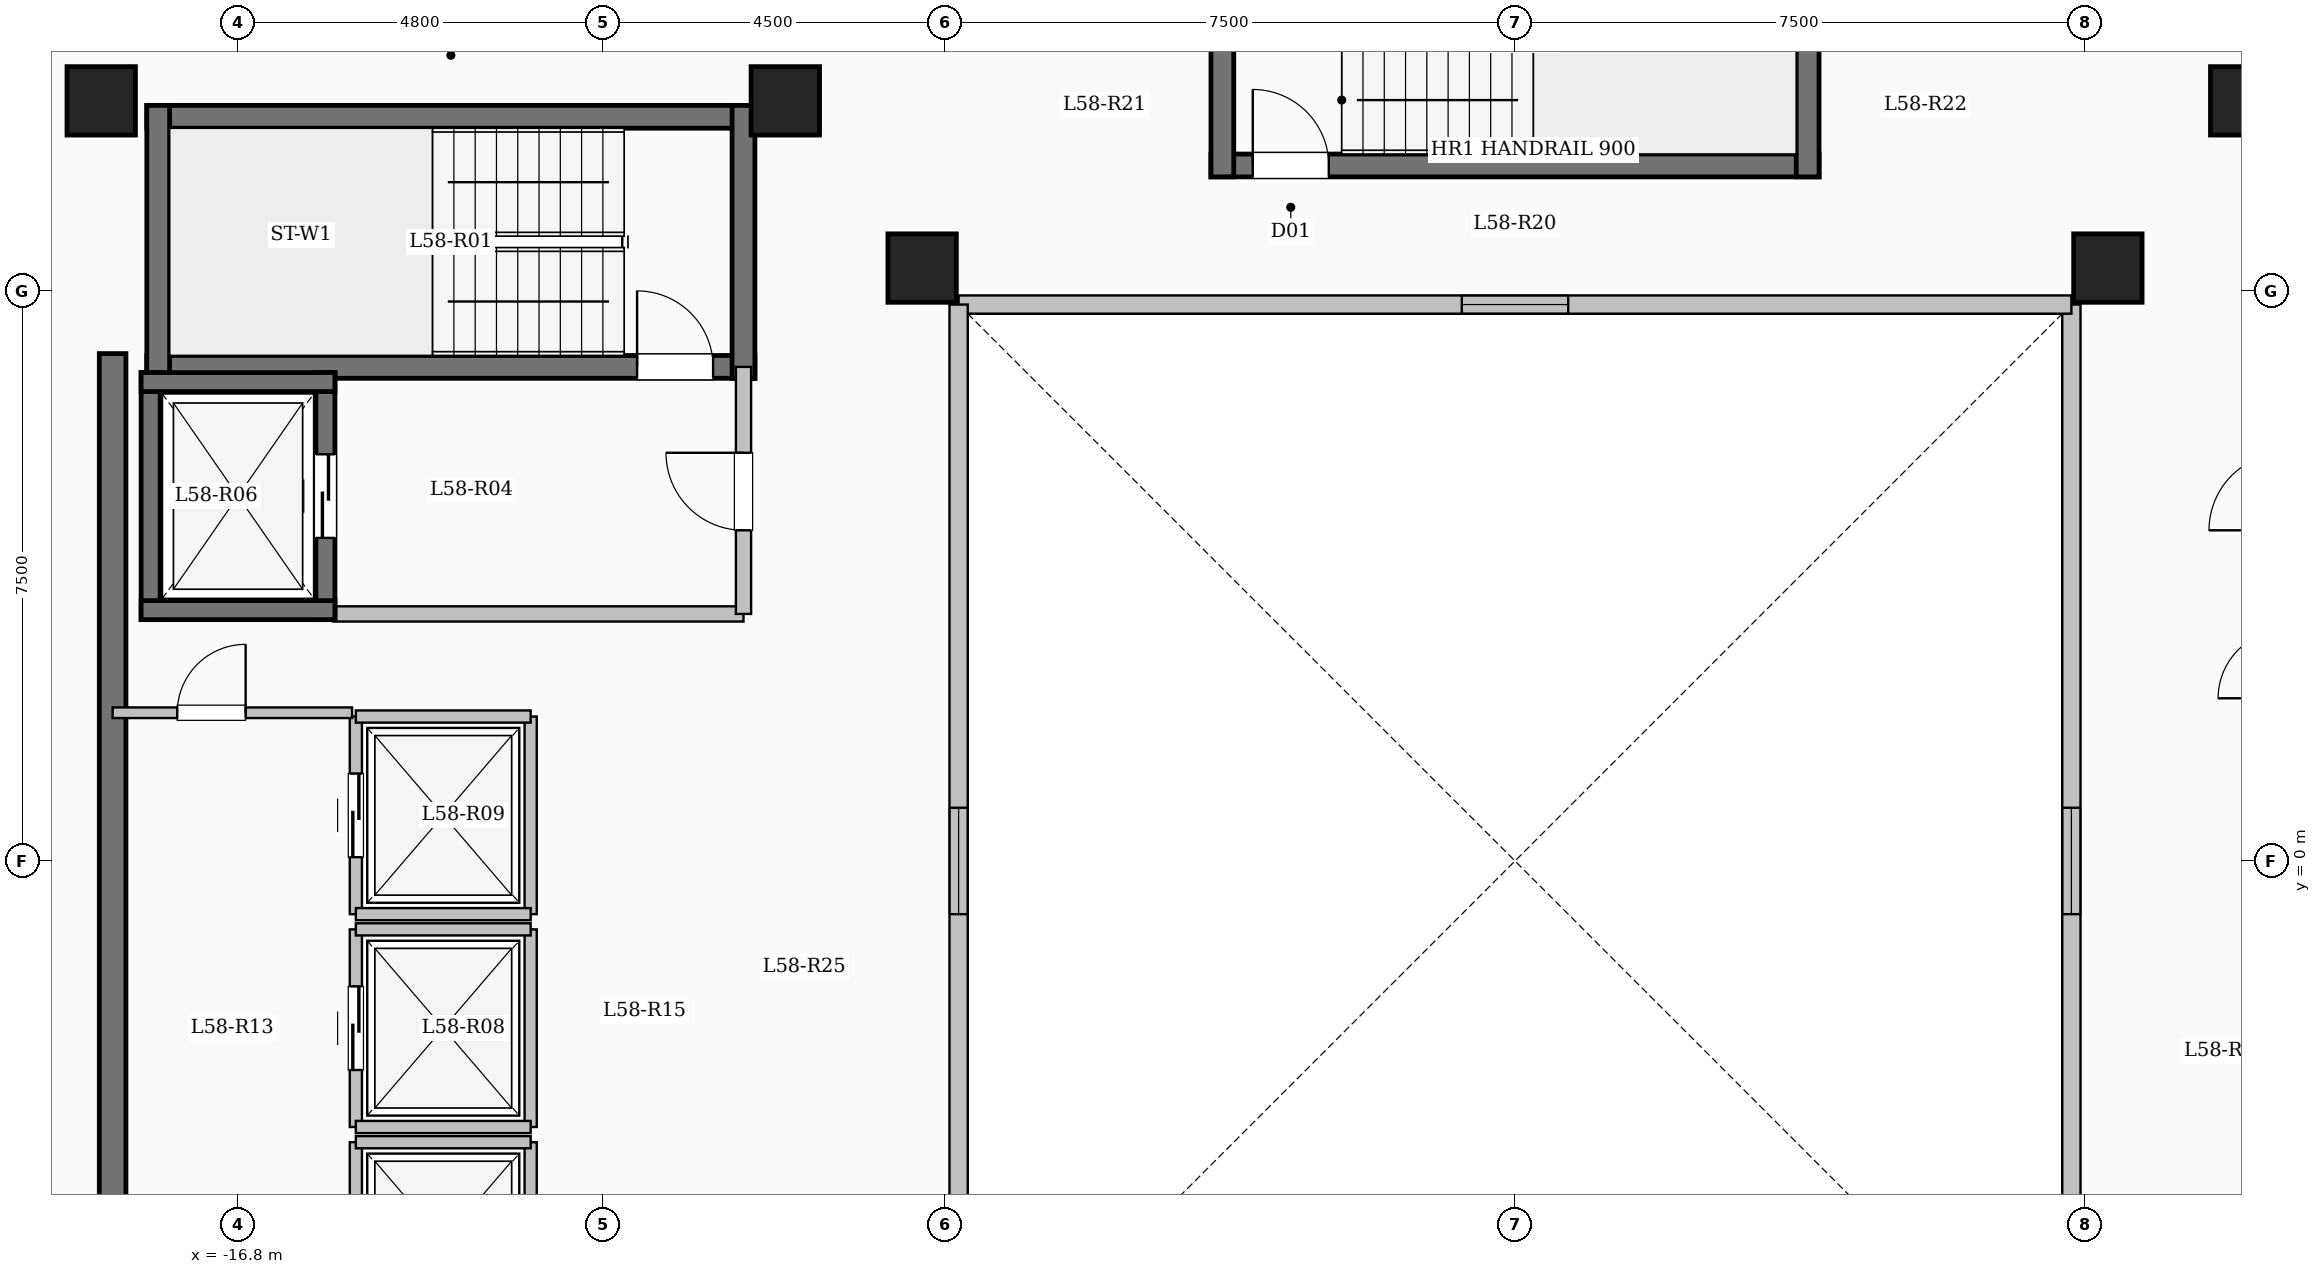
"""IFC4 building model, lengths in metres.
Left out: names, types, materials, properties, quantities, classifications, styles, units other than length and angle.
Written with IfcOpenShell. Run it as: python <this file> out.ifc"""

import sys

from ifc_helpers import new_model, si_unit, direction, frame, frame_2d, origin, origin_2d, place, context, subcontext, project, spatial, rectangle, extrude, element, fill, save


model = new_model("IFC4")
c1 = context("Model", 3, precision=1e-05, world=origin(), true_north=direction((0.0, 1.0)))
c2 = subcontext(c1, "Body", "Model", "MODEL_VIEW")
j1 = project(units=[si_unit("LENGTHUNIT", "METRE"), si_unit("PLANEANGLEUNIT", "RADIAN")], contexts=[c1])
p1 = place(None, origin())
s1 = spatial("IfcSite", under=j1, at=p1, CompositionType="ELEMENT")
p2 = place(p1, origin())
s2 = spatial("IfcBuilding", under=s1, at=p2, CompositionType="ELEMENT")
p3 = place(p2, frame((0.0, 0.0, 213.7)))
s3 = spatial("IfcBuildingStorey", under=s2, at=p3, CompositionType="ELEMENT", Elevation=213.7)
for number, where, z_axis, x_axis in (
    (1, (-7.8, 7.8, 0.0), (0.0, 0.0, 1.0), (1.0, 0.0, 0.0)),
    (2, (7.8, 7.8, 0.0), (0.0, 0.0, 1.0), (1.0, 0.0, 0.0)),
    (3, (-9.6, 10.0, 0.0), (0.0, 0.0, 1.0), (1.0, 0.0, 0.0)),
    (4, (9.6, 10.0, 0.0), (0.0, 0.0, 1.0), (1.0, 0.0, 0.0)),
    (5, (-18.6, 10.0, 0.0), (0.0, 0.0, 1.0), (1.0, 0.0, 0.0)),
):
    element("IfcColumn", number, at=place(p3, frame(where, z_axis=z_axis, x_axis=x_axis)), inside=s3, PredefinedType="COLUMN", context=c2, shape_type="SweptSolid", body=[
        extrude(rectangle(XDim=0.9, YDim=0.9, at=origin_2d()), origin(), (0.0, 0.0, 1.0), 3.35),
    ])
p4 = place(p3, frame((7.32, -7.32, 0.0), z_axis=(0.0, 0.0, 1.0), x_axis=(0.0, 1.0, 0.0)))
e6 = element("IfcWall", 6, at=p4, inside=s3, PredefinedType="SOLIDWALL", context=c2, shape_type="SweptSolid", body=[
    extrude(rectangle(XDim=14.64, YDim=0.24, at=frame_2d((7.32, 0.0))), origin(), (0.0, 0.0, 1.0), 3.1),
])
p5 = place(p4, frame((6.62, 0.0, 0.95)))
e7 = element("IfcOpeningElement", 7, at=p5, cuts=e6, PredefinedType="OPENING", context=c2, shape_type="SweptSolid", body=[
    extrude(rectangle(XDim=1.4, YDim=1.5, at=frame_2d((0.7, 0.75))), frame((0.0, 0.13, 0.0), z_axis=(0.0, -1.0, 0.0), x_axis=(1.0, 0.0, 0.0)), (0.0, 0.0, 1.0), 0.26),
])
p6 = place(p3, frame((7.32, 7.32, 0.0), z_axis=(0.0, 0.0, 1.0), x_axis=(-1.0, 0.0, 0.0)))
e8 = element("IfcWall", 8, at=p6, inside=s3, PredefinedType="SOLIDWALL", context=c2, shape_type="SweptSolid", body=[
    extrude(rectangle(XDim=14.64, YDim=0.24, at=frame_2d((7.32, 0.0))), origin(), (0.0, 0.0, 1.0), 3.1),
])
p7 = place(p6, frame((6.62, 0.0, 0.95)))
e9 = element("IfcOpeningElement", 9, at=p7, cuts=e8, PredefinedType="OPENING", context=c2, shape_type="SweptSolid", body=[
    extrude(rectangle(XDim=1.4, YDim=1.5, at=frame_2d((0.7, 0.75))), frame((0.0, 0.13, 0.0), z_axis=(0.0, -1.0, 0.0), x_axis=(1.0, 0.0, 0.0)), (0.0, 0.0, 1.0), 0.26),
])
p8 = place(p3, frame((-7.32, 7.32, 0.0), z_axis=(0.0, 0.0, 1.0), x_axis=(0.0, -1.0, 0.0)))
e10 = element("IfcWall", 10, at=p8, inside=s3, PredefinedType="SOLIDWALL", context=c2, shape_type="SweptSolid", body=[
    extrude(rectangle(XDim=14.64, YDim=0.24, at=frame_2d((7.32, 0.0))), origin(), (0.0, 0.0, 1.0), 3.1),
])
p9 = place(p8, frame((6.62, 0.0, 0.95)))
e11 = element("IfcOpeningElement", 11, at=p9, cuts=e10, PredefinedType="OPENING", context=c2, shape_type="SweptSolid", body=[
    extrude(rectangle(XDim=1.4, YDim=1.5, at=frame_2d((0.7, 0.75))), frame((0.0, 0.13, 0.0), z_axis=(0.0, -1.0, 0.0), x_axis=(1.0, 0.0, 0.0)), (0.0, 0.0, 1.0), 0.26),
])
p10 = place(p3, frame((-18.0, 9.79, 0.0), z_axis=(0.0, 0.0, 1.0), x_axis=(1.0, 0.0, 0.0)))
e12 = element("IfcWall", 12, at=p10, inside=s3, PredefinedType="SHEAR", context=c2, shape_type="SweptSolid", body=[
    extrude(rectangle(XDim=8.0, YDim=0.3, at=frame_2d((4.0, 0.0))), origin(), (0.0, 0.0, 1.0), 3.35),
])
p11 = place(p3, frame((-18.0, 6.5, 0.0), z_axis=(0.0, 0.0, 1.0), x_axis=(1.0, 0.0, 0.0)))
e13 = element("IfcWall", 13, at=p11, inside=s3, PredefinedType="SHEAR", context=c2, shape_type="SweptSolid", body=[
    extrude(rectangle(XDim=8.0, YDim=0.3, at=frame_2d((4.0, 0.0))), origin(), (0.0, 0.0, 1.0), 3.35),
])
p12 = place(p11, frame((6.45, 0.0, 0.0)))
e14 = element("IfcOpeningElement", 14, at=p12, cuts=e13, PredefinedType="OPENING", context=c2, shape_type="SweptSolid", body=[
    extrude(rectangle(XDim=1.0, YDim=2.15, at=frame_2d((0.5, 1.075))), frame((0.0, 0.16, 0.0), z_axis=(0.0, -1.0, 0.0), x_axis=(1.0, 0.0, 0.0)), (0.0, 0.0, 1.0), 0.32),
])
for number, where, z_axis, x_axis in (
    (15, (-17.85, 6.35, 0.0), (0.0, 0.0, 1.0), (0.0, 1.0, 0.0)),
    (16, (-10.15, 6.35, 0.0), (0.0, 0.0, 1.0), (0.0, 1.0, 0.0)),
):
    element("IfcWall", number, at=place(p3, frame(where, z_axis=z_axis, x_axis=x_axis)), inside=s3, PredefinedType="SHEAR", context=c2, shape_type="SweptSolid", body=[
        extrude(rectangle(XDim=3.59, YDim=0.3, at=frame_2d((1.795, 0.0))), origin(), (0.0, 0.0, 1.0), 3.35),
    ])
p13 = place(p3, frame((-4.0, 9.15, 0.0), z_axis=(0.0, 0.0, 1.0), x_axis=(1.0, 0.0, 0.0)))
e17 = element("IfcWall", 17, at=p13, inside=s3, PredefinedType="SHEAR", context=c2, shape_type="SweptSolid", body=[
    extrude(rectangle(XDim=8.0, YDim=0.3, at=frame_2d((4.0, 0.0))), origin(), (0.0, 0.0, 1.0), 3.35),
])
p14 = place(p13, frame((0.55, 0.0, 0.0)))
e18 = element("IfcOpeningElement", 18, at=p14, cuts=e17, PredefinedType="OPENING", context=c2, shape_type="SweptSolid", body=[
    extrude(rectangle(XDim=1.0, YDim=2.15, at=frame_2d((0.5, 1.075))), frame((0.0, 0.16, 0.0), z_axis=(0.0, -1.0, 0.0), x_axis=(1.0, 0.0, 0.0)), (0.0, 0.0, 1.0), 0.32),
])
for number, where, z_axis, x_axis in (
    (19, (-3.85, 9.0, 0.0), (0.0, 0.0, 1.0), (0.0, 1.0, 0.0)),
    (20, (3.85, 9.0, 0.0), (0.0, 0.0, 1.0), (0.0, 1.0, 0.0)),
):
    element("IfcWall", number, at=place(p3, frame(where, z_axis=z_axis, x_axis=x_axis)), inside=s3, PredefinedType="SHEAR", context=c2, shape_type="SweptSolid", body=[
        extrude(rectangle(XDim=3.59, YDim=0.3, at=frame_2d((1.795, 0.0))), origin(), (0.0, 0.0, 1.0), 3.35),
    ])
p15 = place(p3, frame((-15.55, 3.25, 0.0), z_axis=(0.0, 0.0, 1.0), x_axis=(1.0, 0.0, 0.0)))
e21 = element("IfcWall", 21, at=p15, inside=s3, PredefinedType="SOLIDWALL", context=c2, shape_type="SweptSolid", body=[
    extrude(rectangle(XDim=5.4, YDim=0.2, at=frame_2d((2.7, 0.0))), origin(), (0.0, 0.0, 1.0), 3.1),
])
p16 = place(p3, frame((-10.15, 3.25, 0.0), z_axis=(0.0, 0.0, 1.0), x_axis=(0.0, 1.0, 0.0)))
e22 = element("IfcWall", 22, at=p16, inside=s3, PredefinedType="SOLIDWALL", context=c2, shape_type="SweptSolid", body=[
    extrude(rectangle(XDim=3.25, YDim=0.2, at=frame_2d((1.625, 0.0))), origin(), (0.0, 0.0, 1.0), 3.1),
])
p17 = place(p16, frame((1.1, 0.0, 0.0)))
e23 = element("IfcOpeningElement", 23, at=p17, cuts=e22, PredefinedType="OPENING", context=c2, shape_type="SweptSolid", body=[
    extrude(rectangle(XDim=1.02, YDim=2.15, at=frame_2d((0.51, 1.075))), frame((0.0, 0.11, 0.0), z_axis=(0.0, -1.0, 0.0), x_axis=(1.0, 0.0, 0.0)), (0.0, 0.0, 1.0), 0.22),
])
p18 = place(p3, frame((-17.95, 3.175, 0.0), z_axis=(0.0, 0.0, 1.0), x_axis=(0.0, 1.0, 0.0)))
e24 = element("IfcWall", 24, at=p18, inside=s3, PredefinedType="SHEAR", context=c2, shape_type="SweptSolid", body=[
    extrude(rectangle(XDim=3.25, YDim=0.25, at=frame_2d((1.625, 0.0))), origin(), (0.0, 0.0, 1.0), 3.35),
])
p19 = place(p3, frame((-15.65, 3.175, 0.0), z_axis=(0.0, 0.0, 1.0), x_axis=(0.0, 1.0, 0.0)))
e25 = element("IfcWall", 25, at=p19, inside=s3, PredefinedType="SHEAR", context=c2, shape_type="SweptSolid", body=[
    extrude(rectangle(XDim=3.25, YDim=0.25, at=frame_2d((1.625, 0.0))), origin(), (0.0, 0.0, 1.0), 3.35),
])
p20 = place(p19, frame((1.075, 0.0, 0.0)))
e26 = element("IfcOpeningElement", 26, at=p20, cuts=e25, PredefinedType="OPENING", context=c2, shape_type="SweptSolid", body=[
    extrude(rectangle(XDim=1.1, YDim=2.15, at=frame_2d((0.55, 1.075))), frame((0.0, 0.135, 0.0), z_axis=(0.0, -1.0, 0.0), x_axis=(1.0, 0.0, 0.0)), (0.0, 0.0, 1.0), 0.27),
])
for number, where, z_axis, x_axis in (
    (27, (-18.075, 3.3, 0.0), (0.0, 0.0, 1.0), (1.0, 0.0, 0.0)),
    (28, (-18.075, 6.3, 0.0), (0.0, 0.0, 1.0), (1.0, 0.0, 0.0)),
):
    element("IfcWall", number, at=place(p3, frame(where, z_axis=z_axis, x_axis=x_axis)), inside=s3, PredefinedType="SHEAR", context=c2, shape_type="SweptSolid", body=[
        extrude(rectangle(XDim=2.55, YDim=0.25, at=frame_2d((1.275, 0.0))), origin(), (0.0, 0.0, 1.0), 3.35),
    ])
p21 = place(p3, frame((-15.25, -6.3, 0.0), z_axis=(0.0, 0.0, 1.0), x_axis=(0.0, 1.0, 0.0)))
e29 = element("IfcWall", 29, at=p21, inside=s3, PredefinedType="SOLIDWALL", context=c2, shape_type="SweptSolid", body=[
    extrude(rectangle(XDim=2.6, YDim=0.16, at=frame_2d((1.3, 0.0))), origin(), (0.0, 0.0, 1.0), 3.1),
])
p22 = place(p21, frame((0.75, 0.0, 0.0)))
e30 = element("IfcOpeningElement", 30, at=p22, cuts=e29, PredefinedType="OPENING", context=c2, shape_type="SweptSolid", body=[
    extrude(rectangle(XDim=1.1, YDim=2.15, at=frame_2d((0.55, 1.075))), frame((0.0, 0.09, 0.0), z_axis=(0.0, -1.0, 0.0), x_axis=(1.0, 0.0, 0.0)), (0.0, 0.0, 1.0), 0.18),
])
p23 = place(p3, frame((-12.95, -6.3, 0.0), z_axis=(0.0, 0.0, 1.0), x_axis=(0.0, 1.0, 0.0)))
e31 = element("IfcWall", 31, at=p23, inside=s3, PredefinedType="SOLIDWALL", context=c2, shape_type="SweptSolid", body=[
    extrude(rectangle(XDim=2.6, YDim=0.16, at=frame_2d((1.3, 0.0))), origin(), (0.0, 0.0, 1.0), 3.1),
])
p24 = place(p3, frame((-15.25, -3.7, 0.0), z_axis=(0.0, 0.0, 1.0), x_axis=(1.0, 0.0, 0.0)))
e32 = element("IfcWall", 32, at=p24, inside=s3, PredefinedType="SOLIDWALL", context=c2, shape_type="SweptSolid", body=[
    extrude(rectangle(XDim=2.3, YDim=0.16, at=frame_2d((1.15, 0.0))), origin(), (0.0, 0.0, 1.0), 3.1),
])
p25 = place(p3, frame((-15.25, -3.5, 0.0), z_axis=(0.0, 0.0, 1.0), x_axis=(0.0, 1.0, 0.0)))
e33 = element("IfcWall", 33, at=p25, inside=s3, PredefinedType="SOLIDWALL", context=c2, shape_type="SweptSolid", body=[
    extrude(rectangle(XDim=2.6, YDim=0.16, at=frame_2d((1.3, 0.0))), origin(), (0.0, 0.0, 1.0), 3.1),
])
p26 = place(p25, frame((0.75, 0.0, 0.0)))
e34 = element("IfcOpeningElement", 34, at=p26, cuts=e33, PredefinedType="OPENING", context=c2, shape_type="SweptSolid", body=[
    extrude(rectangle(XDim=1.1, YDim=2.15, at=frame_2d((0.55, 1.075))), frame((0.0, 0.09, 0.0), z_axis=(0.0, -1.0, 0.0), x_axis=(1.0, 0.0, 0.0)), (0.0, 0.0, 1.0), 0.18),
])
p27 = place(p3, frame((-12.95, -3.5, 0.0), z_axis=(0.0, 0.0, 1.0), x_axis=(0.0, 1.0, 0.0)))
e35 = element("IfcWall", 35, at=p27, inside=s3, PredefinedType="SOLIDWALL", context=c2, shape_type="SweptSolid", body=[
    extrude(rectangle(XDim=2.6, YDim=0.16, at=frame_2d((1.3, 0.0))), origin(), (0.0, 0.0, 1.0), 3.1),
])
for number, where, z_axis, x_axis in (
    (36, (-15.25, -3.5, 0.0), (0.0, 0.0, 1.0), (1.0, 0.0, 0.0)),
    (37, (-15.25, -0.9, 0.0), (0.0, 0.0, 1.0), (1.0, 0.0, 0.0)),
):
    element("IfcWall", number, at=place(p3, frame(where, z_axis=z_axis, x_axis=x_axis)), inside=s3, PredefinedType="SOLIDWALL", context=c2, shape_type="SweptSolid", body=[
        extrude(rectangle(XDim=2.3, YDim=0.16, at=frame_2d((1.15, 0.0))), origin(), (0.0, 0.0, 1.0), 3.1),
    ])
p28 = place(p3, frame((-15.25, -0.7, 0.0), z_axis=(0.0, 0.0, 1.0), x_axis=(0.0, 1.0, 0.0)))
e38 = element("IfcWall", 38, at=p28, inside=s3, PredefinedType="SOLIDWALL", context=c2, shape_type="SweptSolid", body=[
    extrude(rectangle(XDim=2.6, YDim=0.16, at=frame_2d((1.3, 0.0))), origin(), (0.0, 0.0, 1.0), 3.1),
])
p29 = place(p28, frame((0.75, 0.0, 0.0)))
e39 = element("IfcOpeningElement", 39, at=p29, cuts=e38, PredefinedType="OPENING", context=c2, shape_type="SweptSolid", body=[
    extrude(rectangle(XDim=1.1, YDim=2.15, at=frame_2d((0.55, 1.075))), frame((0.0, 0.09, 0.0), z_axis=(0.0, -1.0, 0.0), x_axis=(1.0, 0.0, 0.0)), (0.0, 0.0, 1.0), 0.18),
])
p30 = place(p3, frame((-12.95, -0.7, 0.0), z_axis=(0.0, 0.0, 1.0), x_axis=(0.0, 1.0, 0.0)))
e40 = element("IfcWall", 40, at=p30, inside=s3, PredefinedType="SOLIDWALL", context=c2, shape_type="SweptSolid", body=[
    extrude(rectangle(XDim=2.6, YDim=0.16, at=frame_2d((1.3, 0.0))), origin(), (0.0, 0.0, 1.0), 3.1),
])
for number, where, z_axis, x_axis in (
    (41, (-15.25, -0.7, 0.0), (0.0, 0.0, 1.0), (1.0, 0.0, 0.0)),
    (42, (-15.25, 1.9, 0.0), (0.0, 0.0, 1.0), (1.0, 0.0, 0.0)),
):
    element("IfcWall", number, at=place(p3, frame(where, z_axis=z_axis, x_axis=x_axis)), inside=s3, PredefinedType="SOLIDWALL", context=c2, shape_type="SweptSolid", body=[
        extrude(rectangle(XDim=2.3, YDim=0.16, at=frame_2d((1.15, 0.0))), origin(), (0.0, 0.0, 1.0), 3.1),
    ])
p31 = place(p3, frame((-18.45, -7.375, 0.0), z_axis=(0.0, 0.0, 1.0), x_axis=(0.0, 1.0, 0.0)))
e43 = element("IfcWall", 43, at=p31, inside=s3, PredefinedType="SHEAR", context=c2, shape_type="SweptSolid", body=[
    extrude(rectangle(XDim=14.05, YDim=0.35, at=frame_2d((7.025, 0.0))), origin(), (0.0, 0.0, 1.0), 3.35),
])
p32 = place(p3, frame((-18.45, 1.95, 0.0), z_axis=(0.0, 0.0, 1.0), x_axis=(1.0, 0.0, 0.0)))
e44 = element("IfcWall", 44, at=p32, inside=s3, PredefinedType="PARTITIONING", context=c2, shape_type="SweptSolid", body=[
    extrude(rectangle(XDim=3.15, YDim=0.14, at=frame_2d((1.575, 0.0))), origin(), (0.0, 0.0, 1.0), 3.1),
])
p33 = place(p32, frame((0.85, 0.0, 0.0)))
e45 = element("IfcOpeningElement", 45, at=p33, cuts=e44, PredefinedType="OPENING", context=c2, shape_type="SweptSolid", body=[
    extrude(rectangle(XDim=0.9, YDim=2.08, at=frame_2d((0.45, 1.04))), frame((0.0, 0.08, 0.0), z_axis=(0.0, -1.0, 0.0), x_axis=(1.0, 0.0, 0.0)), (0.0, 0.0, 1.0), 0.16),
])
p34 = place(p5, origin())
e46 = element("IfcWindow", 46, at=p34, inside=s3, PartitioningType="SINGLE_PANEL", PredefinedType="WINDOW", context=c2, shape_type="SweptSolid", body=[
    extrude(rectangle(XDim=1.4, YDim=1.5, at=frame_2d((0.7, 0.75))), frame((0.0, 0.03, 0.0), z_axis=(0.0, -1.0, 0.0), x_axis=(1.0, 0.0, 0.0)), (0.0, 0.0, 1.0), 0.06),
])
fill(e7, e46)
p35 = place(p7, origin())
e47 = element("IfcWindow", 47, at=p35, inside=s3, PartitioningType="SINGLE_PANEL", PredefinedType="WINDOW", context=c2, shape_type="SweptSolid", body=[
    extrude(rectangle(XDim=1.4, YDim=1.5, at=frame_2d((0.7, 0.75))), frame((0.0, 0.03, 0.0), z_axis=(0.0, -1.0, 0.0), x_axis=(1.0, 0.0, 0.0)), (0.0, 0.0, 1.0), 0.06),
])
fill(e9, e47)
p36 = place(p9, origin())
e48 = element("IfcWindow", 48, at=p36, inside=s3, PartitioningType="SINGLE_PANEL", PredefinedType="WINDOW", context=c2, shape_type="SweptSolid", body=[
    extrude(rectangle(XDim=1.4, YDim=1.5, at=frame_2d((0.7, 0.75))), frame((0.0, 0.03, 0.0), z_axis=(0.0, -1.0, 0.0), x_axis=(1.0, 0.0, 0.0)), (0.0, 0.0, 1.0), 0.06),
])
fill(e11, e48)
p37 = place(p12, origin())
e49 = element("IfcDoor", 49, at=p37, inside=s3, OperationType="SINGLE_SWING_LEFT", PredefinedType="DOOR", context=c2, shape_type="SweptSolid", body=[
    extrude(rectangle(XDim=1.0, YDim=2.15, at=frame_2d((0.5, 1.075))), frame((0.0, 0.025, 0.0), z_axis=(0.0, -1.0, 0.0), x_axis=(1.0, 0.0, 0.0)), (0.0, 0.0, 1.0), 0.05),
])
fill(e14, e49)
p38 = place(p14, origin())
e50 = element("IfcDoor", 50, at=p38, inside=s3, OperationType="SINGLE_SWING_LEFT", PredefinedType="DOOR", context=c2, shape_type="SweptSolid", body=[
    extrude(rectangle(XDim=1.0, YDim=2.15, at=frame_2d((0.5, 1.075))), frame((0.0, 0.025, 0.0), z_axis=(0.0, -1.0, 0.0), x_axis=(1.0, 0.0, 0.0)), (0.0, 0.0, 1.0), 0.05),
])
fill(e18, e50)
p39 = place(p17, origin())
e51 = element("IfcDoor", 51, at=p39, inside=s3, OperationType="SINGLE_SWING_RIGHT", PredefinedType="DOOR", context=c2, shape_type="SweptSolid", body=[
    extrude(rectangle(XDim=1.02, YDim=2.15, at=frame_2d((0.51, 1.075))), frame((0.0, 0.025, 0.0), z_axis=(0.0, -1.0, 0.0), x_axis=(1.0, 0.0, 0.0)), (0.0, 0.0, 1.0), 0.05),
])
fill(e23, e51)
p40 = place(p20, origin())
e52 = element("IfcDoor", 52, at=p40, inside=s3, OperationType="SLIDING_TO_LEFT", PredefinedType="DOOR", context=c2, shape_type="SweptSolid", body=[
    extrude(rectangle(XDim=1.1, YDim=2.15, at=frame_2d((0.55, 1.075))), frame((0.0, 0.025, 0.0), z_axis=(0.0, -1.0, 0.0), x_axis=(1.0, 0.0, 0.0)), (0.0, 0.0, 1.0), 0.05),
])
fill(e26, e52)
p41 = place(p26, origin())
e53 = element("IfcDoor", 53, at=p41, inside=s3, OperationType="SLIDING_TO_LEFT", PredefinedType="DOOR", context=c2, shape_type="SweptSolid", body=[
    extrude(rectangle(XDim=1.1, YDim=2.15, at=frame_2d((0.55, 1.075))), frame((0.0, 0.025, 0.0), z_axis=(0.0, -1.0, 0.0), x_axis=(1.0, 0.0, 0.0)), (0.0, 0.0, 1.0), 0.05),
])
fill(e34, e53)
p42 = place(p29, origin())
e54 = element("IfcDoor", 54, at=p42, inside=s3, OperationType="SLIDING_TO_LEFT", PredefinedType="DOOR", context=c2, shape_type="SweptSolid", body=[
    extrude(rectangle(XDim=1.1, YDim=2.15, at=frame_2d((0.55, 1.075))), frame((0.0, 0.025, 0.0), z_axis=(0.0, -1.0, 0.0), x_axis=(1.0, 0.0, 0.0)), (0.0, 0.0, 1.0), 0.05),
])
fill(e39, e54)
p43 = place(p33, origin())
e55 = element("IfcDoor", 55, at=p43, inside=s3, OperationType="SINGLE_SWING_RIGHT", PredefinedType="DOOR", context=c2, shape_type="SweptSolid", body=[
    extrude(rectangle(XDim=0.9, YDim=2.08, at=frame_2d((0.45, 1.04))), frame((0.0, 0.025, 0.0), z_axis=(0.0, -1.0, 0.0), x_axis=(1.0, 0.0, 0.0)), (0.0, 0.0, 1.0), 0.05),
])
fill(e45, e55)
save(model, sys.argv[1])
